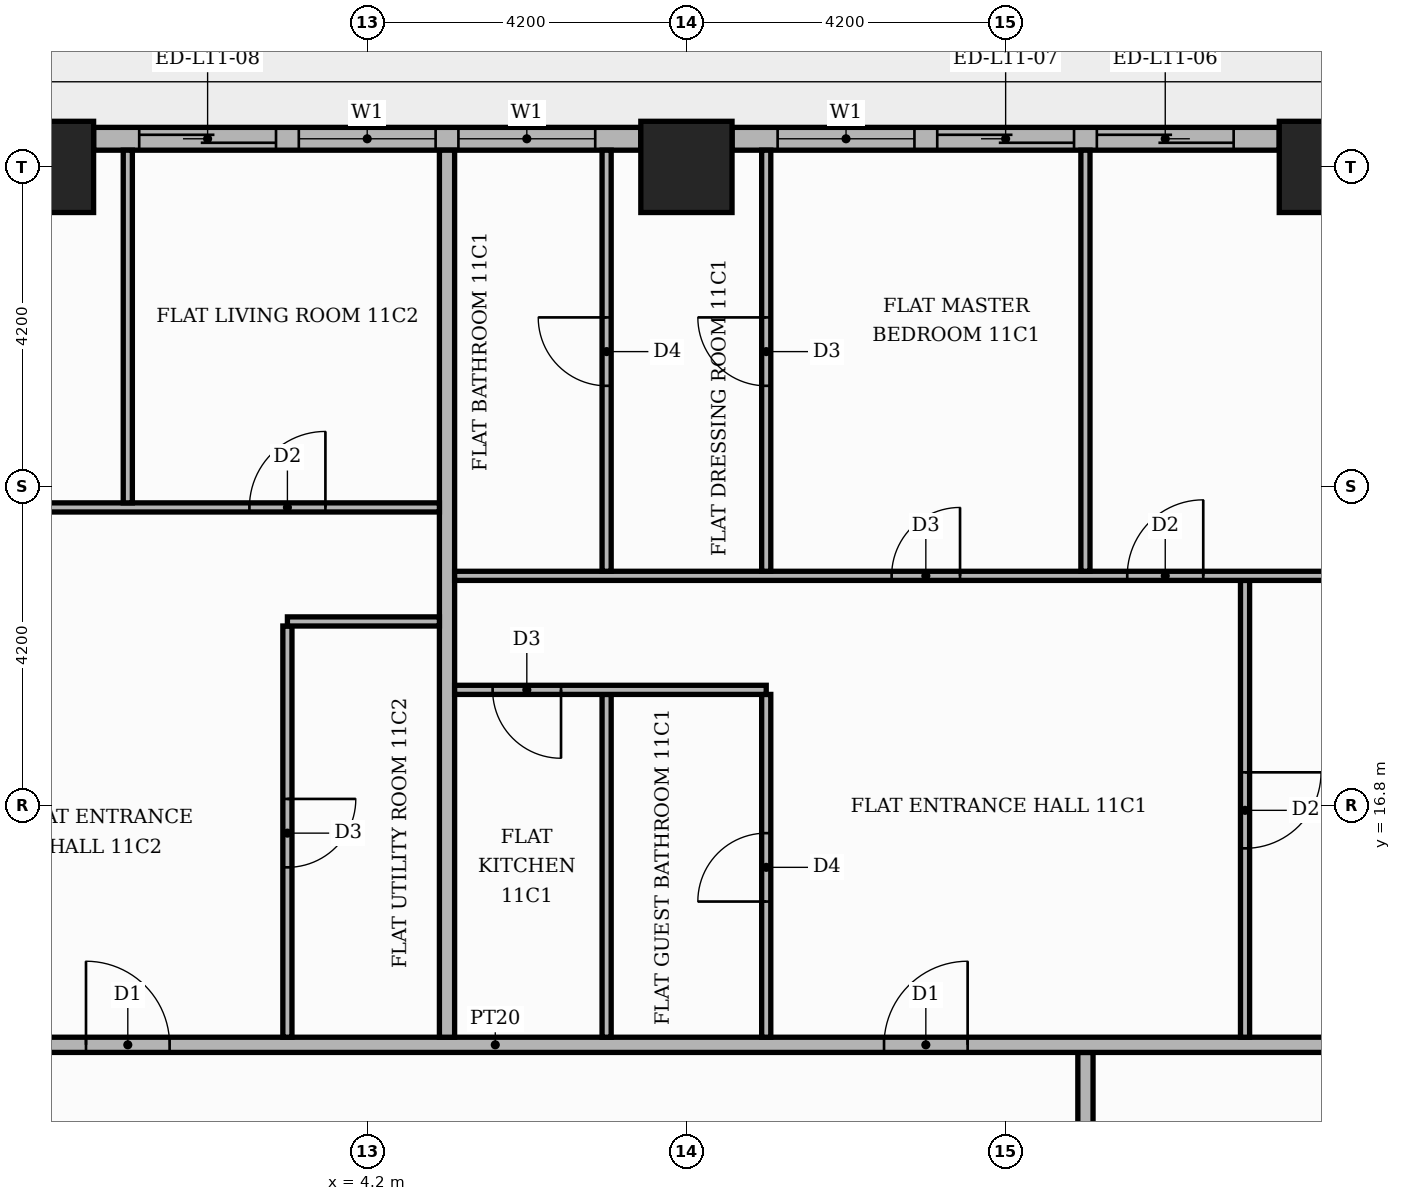
"""IFC4 building model, lengths in metres.
Left out: names, types, materials, properties, quantities, classifications, styles, units other than length and angle.
Written with IfcOpenShell. Run it as: python <this file> out.ifc"""

import sys

from ifc_helpers import new_model, si_unit, direction, frame, frame_2d, origin, origin_2d, place, context, subcontext, project, spatial, rectangle, extrude, element, fill, save


model = new_model("IFC4")
c1 = context("Model", 3, precision=1e-05, world=origin(), true_north=direction((0.0, 1.0)))
c2 = subcontext(c1, "Body", "Model", "MODEL_VIEW")
j1 = project(units=[si_unit("LENGTHUNIT", "METRE"), si_unit("PLANEANGLEUNIT", "RADIAN")], contexts=[c1])
p1 = place(None, origin())
s1 = spatial("IfcSite", under=j1, at=p1, CompositionType="ELEMENT")
p2 = place(p1, origin())
s2 = spatial("IfcBuilding", under=s1, at=p2, CompositionType="ELEMENT")
p3 = place(p2, frame((0.0, 0.0, 50.4)))
s3 = spatial("IfcBuildingStorey", under=s2, at=p3, CompositionType="ELEMENT", Elevation=50.4)
for number, where, z_axis, x_axis in (
    (1, (0.0, 25.2, 0.0), (0.0, 0.0, 1.0), (1.0, 0.0, 0.0)),
    (2, (8.4, 25.2, 0.0), (0.0, 0.0, 1.0), (1.0, 0.0, 0.0)),
    (3, (16.8, 25.2, 0.0), (0.0, 0.0, 1.0), (1.0, 0.0, 0.0)),
):
    element("IfcColumn", number, at=place(p3, frame(where, z_axis=z_axis, x_axis=x_axis)), inside=s3, PredefinedType="COLUMN", context=c2, shape_type="SweptSolid", body=[
        extrude(rectangle(XDim=1.2, YDim=1.2, at=origin_2d()), origin(), (0.0, 0.0, 1.0), 3.9),
    ])
p4 = place(p3, frame((16.2, 25.57, 0.0), z_axis=(0.0, 0.0, 1.0), x_axis=(-1.0, 0.0, 0.0)))
e4 = element("IfcWall", 4, at=p4, inside=s3, PredefinedType="STANDARD", context=c2, shape_type="SweptSolid", body=[
    extrude(rectangle(XDim=7.2, YDim=0.3, at=frame_2d((3.6, 0.0))), origin(), (0.0, 0.0, 1.0), 3.48),
])
p5 = place(p4, frame((0.6, 0.0, 0.0)))
e5 = element("IfcOpeningElement", 5, at=p5, cuts=e4, PredefinedType="OPENING", context=c2, shape_type="SweptSolid", body=[
    extrude(rectangle(XDim=1.8, YDim=2.4, at=frame_2d((0.9, 1.2))), frame((0.0, 0.16, 0.0), z_axis=(0.0, -1.0, 0.0), x_axis=(1.0, 0.0, 0.0)), (0.0, 0.0, 1.0), 0.32),
])
p6 = place(p4, frame((2.7, 0.0, 0.0)))
e6 = element("IfcOpeningElement", 6, at=p6, cuts=e4, PredefinedType="OPENING", context=c2, shape_type="SweptSolid", body=[
    extrude(rectangle(XDim=1.8, YDim=2.4, at=frame_2d((0.9, 1.2))), frame((0.0, 0.16, 0.0), z_axis=(0.0, -1.0, 0.0), x_axis=(1.0, 0.0, 0.0)), (0.0, 0.0, 1.0), 0.32),
])
p7 = place(p4, frame((4.8, 0.0, 0.9)))
e7 = element("IfcOpeningElement", 7, at=p7, cuts=e4, PredefinedType="OPENING", context=c2, shape_type="SweptSolid", body=[
    extrude(rectangle(XDim=1.8, YDim=2.1, at=frame_2d((0.9, 1.05))), frame((0.0, 0.16, 0.0), z_axis=(0.0, -1.0, 0.0), x_axis=(1.0, 0.0, 0.0)), (0.0, 0.0, 1.0), 0.32),
])
p8 = place(p3, frame((7.8, 25.57, 0.0), z_axis=(0.0, 0.0, 1.0), x_axis=(-1.0, 0.0, 0.0)))
e8 = element("IfcWall", 8, at=p8, inside=s3, PredefinedType="STANDARD", context=c2, shape_type="SweptSolid", body=[
    extrude(rectangle(XDim=7.2, YDim=0.3, at=frame_2d((3.6, 0.0))), origin(), (0.0, 0.0, 1.0), 3.48),
])
p9 = place(p8, frame((0.6, 0.0, 0.9)))
e9 = element("IfcOpeningElement", 9, at=p9, cuts=e8, PredefinedType="OPENING", context=c2, shape_type="SweptSolid", body=[
    extrude(rectangle(XDim=1.8, YDim=2.1, at=frame_2d((0.9, 1.05))), frame((0.0, 0.16, 0.0), z_axis=(0.0, -1.0, 0.0), x_axis=(1.0, 0.0, 0.0)), (0.0, 0.0, 1.0), 0.32),
])
p10 = place(p8, frame((2.7, 0.0, 0.9)))
e10 = element("IfcOpeningElement", 10, at=p10, cuts=e8, PredefinedType="OPENING", context=c2, shape_type="SweptSolid", body=[
    extrude(rectangle(XDim=1.8, YDim=2.1, at=frame_2d((0.9, 1.05))), frame((0.0, 0.16, 0.0), z_axis=(0.0, -1.0, 0.0), x_axis=(1.0, 0.0, 0.0)), (0.0, 0.0, 1.0), 0.32),
])
p11 = place(p8, frame((4.8, 0.0, 0.0)))
e11 = element("IfcOpeningElement", 11, at=p11, cuts=e8, PredefinedType="OPENING", context=c2, shape_type="SweptSolid", body=[
    extrude(rectangle(XDim=1.8, YDim=2.4, at=frame_2d((0.9, 1.2))), frame((0.0, 0.16, 0.0), z_axis=(0.0, -1.0, 0.0), x_axis=(1.0, 0.0, 0.0)), (0.0, 0.0, 1.0), 0.32),
])
p12 = place(p3, frame((13.65, -13.55, 0.0), z_axis=(0.0, 0.0, 1.0), x_axis=(0.0, 1.0, 0.0)))
e12 = element("IfcWall", 12, at=p12, inside=s3, PredefinedType="PARTITIONING", context=c2, shape_type="SweptSolid", body=[
    extrude(rectangle(XDim=27.1, YDim=0.2, at=frame_2d((13.55, 0.0))), origin(), (0.0, 0.0, 1.0), 3.48),
])
p13 = place(p12, frame((1.45, 0.0, 0.0)))
e13 = element("IfcOpeningElement", 13, at=p13, cuts=e12, PredefinedType="OPENING", context=c2, shape_type="SweptSolid", body=[
    extrude(rectangle(XDim=1.1, YDim=2.4, at=frame_2d((0.55, 1.2))), frame((0.0, 0.11, 0.0), z_axis=(0.0, -1.0, 0.0), x_axis=(1.0, 0.0, 0.0)), (0.0, 0.0, 1.0), 0.22),
])
p14 = place(p3, frame((-13.65, 13.65, 0.0), z_axis=(0.0, 0.0, 1.0), x_axis=(1.0, 0.0, 0.0)))
e14 = element("IfcWall", 14, at=p14, inside=s3, PredefinedType="PARTITIONING", context=c2, shape_type="SweptSolid", body=[
    extrude(rectangle(XDim=39.07, YDim=0.2, at=frame_2d((19.535, 0.0))), origin(), (0.0, 0.0, 1.0), 3.48),
])
p15 = place(p14, frame((24.65, 0.0, 0.0)))
e15 = element("IfcOpeningElement", 15, at=p15, cuts=e14, PredefinedType="OPENING", context=c2, shape_type="SweptSolid", body=[
    extrude(rectangle(XDim=1.1, YDim=2.4, at=frame_2d((0.55, 1.2))), frame((0.0, 0.11, 0.0), z_axis=(0.0, -1.0, 0.0), x_axis=(1.0, 0.0, 0.0)), (0.0, 0.0, 1.0), 0.22),
])
p16 = place(p14, frame((14.15, 0.0, 0.0)))
e16 = element("IfcOpeningElement", 16, at=p16, cuts=e14, PredefinedType="OPENING", context=c2, shape_type="SweptSolid", body=[
    extrude(rectangle(XDim=1.1, YDim=2.4, at=frame_2d((0.55, 1.2))), frame((0.0, 0.11, 0.0), z_axis=(0.0, -1.0, 0.0), x_axis=(1.0, 0.0, 0.0)), (0.0, 0.0, 1.0), 0.22),
])
p17 = place(p3, frame((3.15, 13.75, 0.0), z_axis=(0.0, 0.0, 1.0), x_axis=(0.0, 1.0, 0.0)))
e17 = element("IfcWall", 17, at=p17, inside=s3, PredefinedType="PARTITIONING", context=c2, shape_type="SweptSolid", body=[
    extrude(rectangle(XDim=5.41, YDim=0.12, at=frame_2d((2.705, 0.0))), origin(), (0.0, 0.0, 1.0), 3.48),
])
p18 = place(p17, frame((2.235, 0.0, 0.0)))
e18 = element("IfcOpeningElement", 18, at=p18, cuts=e17, PredefinedType="OPENING", context=c2, shape_type="SweptSolid", body=[
    extrude(rectangle(XDim=0.9, YDim=2.1, at=frame_2d((0.45, 1.05))), frame((0.0, 0.07, 0.0), z_axis=(0.0, -1.0, 0.0), x_axis=(1.0, 0.0, 0.0)), (0.0, 0.0, 1.0), 0.14),
])
p19 = place(p3, frame((5.25, 13.75, 0.0), z_axis=(0.0, 0.0, 1.0), x_axis=(0.0, 1.0, 0.0)))
e19 = element("IfcWall", 19, at=p19, inside=s3, PredefinedType="PARTITIONING", context=c2, shape_type="SweptSolid", body=[
    extrude(rectangle(XDim=11.67, YDim=0.2, at=frame_2d((5.835, 0.0))), origin(), (0.0, 0.0, 1.0), 3.48),
])
p20 = place(p3, frame((7.35, 13.75, 0.0), z_axis=(0.0, 0.0, 1.0), x_axis=(0.0, 1.0, 0.0)))
e20 = element("IfcWall", 20, at=p20, inside=s3, PredefinedType="PARTITIONING", context=c2, shape_type="SweptSolid", body=[
    extrude(rectangle(XDim=4.51, YDim=0.12, at=frame_2d((2.255, 0.0))), origin(), (0.0, 0.0, 1.0), 3.48),
])
p21 = place(p3, frame((9.45, 13.75, 0.0), z_axis=(0.0, 0.0, 1.0), x_axis=(0.0, 1.0, 0.0)))
e21 = element("IfcWall", 21, at=p21, inside=s3, PredefinedType="PARTITIONING", context=c2, shape_type="SweptSolid", body=[
    extrude(rectangle(XDim=4.51, YDim=0.12, at=frame_2d((2.255, 0.0))), origin(), (0.0, 0.0, 1.0), 3.48),
])
p22 = place(p21, frame((1.785, 0.0, 0.0)))
e22 = element("IfcOpeningElement", 22, at=p22, cuts=e21, PredefinedType="OPENING", context=c2, shape_type="SweptSolid", body=[
    extrude(rectangle(XDim=0.9, YDim=2.1, at=frame_2d((0.45, 1.05))), frame((0.0, 0.07, 0.0), z_axis=(0.0, -1.0, 0.0), x_axis=(1.0, 0.0, 0.0)), (0.0, 0.0, 1.0), 0.14),
])
p23 = place(p3, frame((15.75, 13.75, 0.0), z_axis=(0.0, 0.0, 1.0), x_axis=(0.0, 1.0, 0.0)))
e23 = element("IfcWall", 23, at=p23, inside=s3, PredefinedType="PARTITIONING", context=c2, shape_type="SweptSolid", body=[
    extrude(rectangle(XDim=6.01, YDim=0.12, at=frame_2d((3.005, 0.0))), origin(), (0.0, 0.0, 1.0), 3.48),
])
p24 = place(p23, frame((2.485, 0.0, 0.0)))
e24 = element("IfcOpeningElement", 24, at=p24, cuts=e23, PredefinedType="OPENING", context=c2, shape_type="SweptSolid", body=[
    extrude(rectangle(XDim=1.0, YDim=2.1, at=frame_2d((0.5, 1.05))), frame((0.0, 0.07, 0.0), z_axis=(0.0, -1.0, 0.0), x_axis=(1.0, 0.0, 0.0)), (0.0, 0.0, 1.0), 0.14),
])
p25 = place(p3, frame((5.35, 18.32, 0.0), z_axis=(0.0, 0.0, 1.0), x_axis=(1.0, 0.0, 0.0)))
e25 = element("IfcWall", 25, at=p25, inside=s3, PredefinedType="PARTITIONING", context=c2, shape_type="SweptSolid", body=[
    extrude(rectangle(XDim=4.1, YDim=0.12, at=frame_2d((2.05, 0.0))), origin(), (0.0, 0.0, 1.0), 3.48),
])
p26 = place(p25, frame((0.5, 0.0, 0.0)))
e26 = element("IfcOpeningElement", 26, at=p26, cuts=e25, PredefinedType="OPENING", context=c2, shape_type="SweptSolid", body=[
    extrude(rectangle(XDim=0.9, YDim=2.1, at=frame_2d((0.45, 1.05))), frame((0.0, 0.07, 0.0), z_axis=(0.0, -1.0, 0.0), x_axis=(1.0, 0.0, 0.0)), (0.0, 0.0, 1.0), 0.14),
])
p27 = place(p3, frame((3.15, 19.22, 0.0), z_axis=(0.0, 0.0, 1.0), x_axis=(1.0, 0.0, 0.0)))
e27 = element("IfcWall", 27, at=p27, inside=s3, PredefinedType="PARTITIONING", context=c2, shape_type="SweptSolid", body=[
    extrude(rectangle(XDim=2.0, YDim=0.12, at=frame_2d((1.0, 0.0))), origin(), (0.0, 0.0, 1.0), 3.48),
])
p28 = place(p3, frame((5.35, 19.82, 0.0), z_axis=(0.0, 0.0, 1.0), x_axis=(1.0, 0.0, 0.0)))
e28 = element("IfcWall", 28, at=p28, inside=s3, PredefinedType="PARTITIONING", context=c2, shape_type="SweptSolid", body=[
    extrude(rectangle(XDim=11.95, YDim=0.12, at=frame_2d((5.975, 0.0))), origin(), (0.0, 0.0, 1.0), 3.48),
])
p29 = place(p28, frame((8.85, 0.0, 0.0)))
e29 = element("IfcOpeningElement", 29, at=p29, cuts=e28, PredefinedType="OPENING", context=c2, shape_type="SweptSolid", body=[
    extrude(rectangle(XDim=1.0, YDim=2.1, at=frame_2d((0.5, 1.05))), frame((0.0, 0.07, 0.0), z_axis=(0.0, -1.0, 0.0), x_axis=(1.0, 0.0, 0.0)), (0.0, 0.0, 1.0), 0.14),
])
p30 = place(p28, frame((5.75, 0.0, 0.0)))
e30 = element("IfcOpeningElement", 30, at=p30, cuts=e28, PredefinedType="OPENING", context=c2, shape_type="SweptSolid", body=[
    extrude(rectangle(XDim=0.9, YDim=2.1, at=frame_2d((0.45, 1.05))), frame((0.0, 0.07, 0.0), z_axis=(0.0, -1.0, 0.0), x_axis=(1.0, 0.0, 0.0)), (0.0, 0.0, 1.0), 0.14),
])
p31 = place(p3, frame((7.35, 19.88, 0.0), z_axis=(0.0, 0.0, 1.0), x_axis=(0.0, 1.0, 0.0)))
e31 = element("IfcWall", 31, at=p31, inside=s3, PredefinedType="PARTITIONING", context=c2, shape_type="SweptSolid", body=[
    extrude(rectangle(XDim=5.54, YDim=0.12, at=frame_2d((2.77, 0.0))), origin(), (0.0, 0.0, 1.0), 3.48),
])
p32 = place(p31, frame((2.44, 0.0, 0.0)))
e32 = element("IfcOpeningElement", 32, at=p32, cuts=e31, PredefinedType="OPENING", context=c2, shape_type="SweptSolid", body=[
    extrude(rectangle(XDim=0.9, YDim=2.1, at=frame_2d((0.45, 1.05))), frame((0.0, 0.07, 0.0), z_axis=(0.0, -1.0, 0.0), x_axis=(1.0, 0.0, 0.0)), (0.0, 0.0, 1.0), 0.14),
])
p33 = place(p3, frame((9.45, 19.88, 0.0), z_axis=(0.0, 0.0, 1.0), x_axis=(0.0, 1.0, 0.0)))
e33 = element("IfcWall", 33, at=p33, inside=s3, PredefinedType="PARTITIONING", context=c2, shape_type="SweptSolid", body=[
    extrude(rectangle(XDim=5.54, YDim=0.12, at=frame_2d((2.77, 0.0))), origin(), (0.0, 0.0, 1.0), 3.48),
])
p34 = place(p33, frame((2.44, 0.0, 0.0)))
e34 = element("IfcOpeningElement", 34, at=p34, cuts=e33, PredefinedType="OPENING", context=c2, shape_type="SweptSolid", body=[
    extrude(rectangle(XDim=0.9, YDim=2.1, at=frame_2d((0.45, 1.05))), frame((0.0, 0.07, 0.0), z_axis=(0.0, -1.0, 0.0), x_axis=(1.0, 0.0, 0.0)), (0.0, 0.0, 1.0), 0.14),
])
p35 = place(p3, frame((13.65, 19.88, 0.0), z_axis=(0.0, 0.0, 1.0), x_axis=(0.0, 1.0, 0.0)))
e35 = element("IfcWall", 35, at=p35, inside=s3, PredefinedType="PARTITIONING", context=c2, shape_type="SweptSolid", body=[
    extrude(rectangle(XDim=5.54, YDim=0.12, at=frame_2d((2.77, 0.0))), origin(), (0.0, 0.0, 1.0), 3.48),
])
p36 = place(p3, frame((-13.55, 20.72, 0.0), z_axis=(0.0, 0.0, 1.0), x_axis=(1.0, 0.0, 0.0)))
e36 = element("IfcWall", 36, at=p36, inside=s3, PredefinedType="PARTITIONING", context=c2, shape_type="SweptSolid", body=[
    extrude(rectangle(XDim=18.7, YDim=0.12, at=frame_2d((9.35, 0.0))), origin(), (0.0, 0.0, 1.0), 3.48),
])
p37 = place(p36, frame((16.2, 0.0, 0.0)))
e37 = element("IfcOpeningElement", 37, at=p37, cuts=e36, PredefinedType="OPENING", context=c2, shape_type="SweptSolid", body=[
    extrude(rectangle(XDim=1.0, YDim=2.1, at=frame_2d((0.5, 1.05))), frame((0.0, 0.07, 0.0), z_axis=(0.0, -1.0, 0.0), x_axis=(1.0, 0.0, 0.0)), (0.0, 0.0, 1.0), 0.14),
])
p38 = place(p36, frame((12.05, 0.0, 0.0)))
e38 = element("IfcOpeningElement", 38, at=p38, cuts=e36, PredefinedType="OPENING", context=c2, shape_type="SweptSolid", body=[
    extrude(rectangle(XDim=0.9, YDim=2.1, at=frame_2d((0.45, 1.05))), frame((0.0, 0.07, 0.0), z_axis=(0.0, -1.0, 0.0), x_axis=(1.0, 0.0, 0.0)), (0.0, 0.0, 1.0), 0.14),
])
p39 = place(p36, frame((3.65, 0.0, 0.0)))
e39 = element("IfcOpeningElement", 39, at=p39, cuts=e36, PredefinedType="OPENING", context=c2, shape_type="SweptSolid", body=[
    extrude(rectangle(XDim=0.9, YDim=2.1, at=frame_2d((0.45, 1.05))), frame((0.0, 0.07, 0.0), z_axis=(0.0, -1.0, 0.0), x_axis=(1.0, 0.0, 0.0)), (0.0, 0.0, 1.0), 0.14),
])
p40 = place(p3, frame((1.05, 20.78, 0.0), z_axis=(0.0, 0.0, 1.0), x_axis=(0.0, 1.0, 0.0)))
e40 = element("IfcWall", 40, at=p40, inside=s3, PredefinedType="PARTITIONING", context=c2, shape_type="SweptSolid", body=[
    extrude(rectangle(XDim=4.64, YDim=0.12, at=frame_2d((2.32, 0.0))), origin(), (0.0, 0.0, 1.0), 3.48),
])
p41 = place(p5, origin())
e41 = element("IfcDoor", 41, at=p41, inside=s3, OperationType="SLIDING_TO_LEFT", PredefinedType="DOOR", context=c2, shape_type="SweptSolid", body=[
    extrude(rectangle(XDim=1.8, YDim=2.4, at=frame_2d((0.9, 1.2))), frame((0.0, 0.025, 0.0), z_axis=(0.0, -1.0, 0.0), x_axis=(1.0, 0.0, 0.0)), (0.0, 0.0, 1.0), 0.05),
])
fill(e5, e41)
p42 = place(p6, origin())
e42 = element("IfcDoor", 42, at=p42, inside=s3, OperationType="SLIDING_TO_RIGHT", PredefinedType="DOOR", context=c2, shape_type="SweptSolid", body=[
    extrude(rectangle(XDim=1.8, YDim=2.4, at=frame_2d((0.9, 1.2))), frame((0.0, 0.025, 0.0), z_axis=(0.0, -1.0, 0.0), x_axis=(1.0, 0.0, 0.0)), (0.0, 0.0, 1.0), 0.05),
])
fill(e6, e42)
p43 = place(p7, origin())
e43 = element("IfcWindow", 43, at=p43, inside=s3, PartitioningType="SINGLE_PANEL", PredefinedType="WINDOW", context=c2, shape_type="SweptSolid", body=[
    extrude(rectangle(XDim=1.8, YDim=2.1, at=frame_2d((0.9, 1.05))), frame((0.0, 0.03, 0.0), z_axis=(0.0, -1.0, 0.0), x_axis=(1.0, 0.0, 0.0)), (0.0, 0.0, 1.0), 0.06),
])
fill(e7, e43)
p44 = place(p9, origin())
e44 = element("IfcWindow", 44, at=p44, inside=s3, PartitioningType="SINGLE_PANEL", PredefinedType="WINDOW", context=c2, shape_type="SweptSolid", body=[
    extrude(rectangle(XDim=1.8, YDim=2.1, at=frame_2d((0.9, 1.05))), frame((0.0, 0.03, 0.0), z_axis=(0.0, -1.0, 0.0), x_axis=(1.0, 0.0, 0.0)), (0.0, 0.0, 1.0), 0.06),
])
fill(e9, e44)
p45 = place(p10, origin())
e45 = element("IfcWindow", 45, at=p45, inside=s3, PartitioningType="SINGLE_PANEL", PredefinedType="WINDOW", context=c2, shape_type="SweptSolid", body=[
    extrude(rectangle(XDim=1.8, YDim=2.1, at=frame_2d((0.9, 1.05))), frame((0.0, 0.03, 0.0), z_axis=(0.0, -1.0, 0.0), x_axis=(1.0, 0.0, 0.0)), (0.0, 0.0, 1.0), 0.06),
])
fill(e10, e45)
p46 = place(p11, origin())
e46 = element("IfcDoor", 46, at=p46, inside=s3, OperationType="SLIDING_TO_RIGHT", PredefinedType="DOOR", context=c2, shape_type="SweptSolid", body=[
    extrude(rectangle(XDim=1.8, YDim=2.4, at=frame_2d((0.9, 1.2))), frame((0.0, 0.025, 0.0), z_axis=(0.0, -1.0, 0.0), x_axis=(1.0, 0.0, 0.0)), (0.0, 0.0, 1.0), 0.05),
])
fill(e11, e46)
p47 = place(p15, origin())
e47 = element("IfcDoor", 47, at=p47, inside=s3, OperationType="SINGLE_SWING_RIGHT", PredefinedType="DOOR", context=c2, shape_type="SweptSolid", body=[
    extrude(rectangle(XDim=1.1, YDim=2.4, at=frame_2d((0.55, 1.2))), frame((0.0, 0.025, 0.0), z_axis=(0.0, -1.0, 0.0), x_axis=(1.0, 0.0, 0.0)), (0.0, 0.0, 1.0), 0.05),
])
fill(e15, e47)
p48 = place(p24, frame((1.0, 0.0, 0.0), z_axis=(0.0, 0.0, 1.0), x_axis=(-1.0, 0.0, 0.0)))
e48 = element("IfcDoor", 48, at=p48, inside=s3, OperationType="SINGLE_SWING_RIGHT", PredefinedType="DOOR", context=c2, shape_type="SweptSolid", body=[
    extrude(rectangle(XDim=1.0, YDim=2.1, at=frame_2d((0.5, 1.05))), frame((0.0, 0.025, 0.0), z_axis=(0.0, -1.0, 0.0), x_axis=(1.0, 0.0, 0.0)), (0.0, 0.0, 1.0), 0.05),
])
fill(e24, e48)
p49 = place(p22, origin())
e49 = element("IfcDoor", 49, at=p49, inside=s3, OperationType="SINGLE_SWING_LEFT", PredefinedType="DOOR", context=c2, shape_type="SweptSolid", body=[
    extrude(rectangle(XDim=0.9, YDim=2.1, at=frame_2d((0.45, 1.05))), frame((0.0, 0.025, 0.0), z_axis=(0.0, -1.0, 0.0), x_axis=(1.0, 0.0, 0.0)), (0.0, 0.0, 1.0), 0.05),
])
fill(e22, e49)
p50 = place(p26, frame((0.9, 0.0, 0.0), z_axis=(0.0, 0.0, 1.0), x_axis=(-1.0, 0.0, 0.0)))
e50 = element("IfcDoor", 50, at=p50, inside=s3, OperationType="SINGLE_SWING_RIGHT", PredefinedType="DOOR", context=c2, shape_type="SweptSolid", body=[
    extrude(rectangle(XDim=0.9, YDim=2.1, at=frame_2d((0.45, 1.05))), frame((0.0, 0.025, 0.0), z_axis=(0.0, -1.0, 0.0), x_axis=(1.0, 0.0, 0.0)), (0.0, 0.0, 1.0), 0.05),
])
fill(e26, e50)
p51 = place(p29, origin())
e51 = element("IfcDoor", 51, at=p51, inside=s3, OperationType="SINGLE_SWING_RIGHT", PredefinedType="DOOR", context=c2, shape_type="SweptSolid", body=[
    extrude(rectangle(XDim=1.0, YDim=2.1, at=frame_2d((0.5, 1.05))), frame((0.0, 0.025, 0.0), z_axis=(0.0, -1.0, 0.0), x_axis=(1.0, 0.0, 0.0)), (0.0, 0.0, 1.0), 0.05),
])
fill(e29, e51)
p52 = place(p30, origin())
e52 = element("IfcDoor", 52, at=p52, inside=s3, OperationType="SINGLE_SWING_RIGHT", PredefinedType="DOOR", context=c2, shape_type="SweptSolid", body=[
    extrude(rectangle(XDim=0.9, YDim=2.1, at=frame_2d((0.45, 1.05))), frame((0.0, 0.025, 0.0), z_axis=(0.0, -1.0, 0.0), x_axis=(1.0, 0.0, 0.0)), (0.0, 0.0, 1.0), 0.05),
])
fill(e30, e52)
p53 = place(p34, origin())
e53 = element("IfcDoor", 53, at=p53, inside=s3, OperationType="SINGLE_SWING_RIGHT", PredefinedType="DOOR", context=c2, shape_type="SweptSolid", body=[
    extrude(rectangle(XDim=0.9, YDim=2.1, at=frame_2d((0.45, 1.05))), frame((0.0, 0.025, 0.0), z_axis=(0.0, -1.0, 0.0), x_axis=(1.0, 0.0, 0.0)), (0.0, 0.0, 1.0), 0.05),
])
fill(e34, e53)
p54 = place(p32, origin())
e54 = element("IfcDoor", 54, at=p54, inside=s3, OperationType="SINGLE_SWING_RIGHT", PredefinedType="DOOR", context=c2, shape_type="SweptSolid", body=[
    extrude(rectangle(XDim=0.9, YDim=2.1, at=frame_2d((0.45, 1.05))), frame((0.0, 0.025, 0.0), z_axis=(0.0, -1.0, 0.0), x_axis=(1.0, 0.0, 0.0)), (0.0, 0.0, 1.0), 0.05),
])
fill(e32, e54)
p55 = place(p16, origin())
e55 = element("IfcDoor", 55, at=p55, inside=s3, OperationType="SINGLE_SWING_LEFT", PredefinedType="DOOR", context=c2, shape_type="SweptSolid", body=[
    extrude(rectangle(XDim=1.1, YDim=2.4, at=frame_2d((0.55, 1.2))), frame((0.0, 0.025, 0.0), z_axis=(0.0, -1.0, 0.0), x_axis=(1.0, 0.0, 0.0)), (0.0, 0.0, 1.0), 0.05),
])
fill(e16, e55)
p56 = place(p18, frame((0.9, 0.0, 0.0), z_axis=(0.0, 0.0, 1.0), x_axis=(-1.0, 0.0, 0.0)))
e56 = element("IfcDoor", 56, at=p56, inside=s3, OperationType="SINGLE_SWING_RIGHT", PredefinedType="DOOR", context=c2, shape_type="SweptSolid", body=[
    extrude(rectangle(XDim=0.9, YDim=2.1, at=frame_2d((0.45, 1.05))), frame((0.0, 0.025, 0.0), z_axis=(0.0, -1.0, 0.0), x_axis=(1.0, 0.0, 0.0)), (0.0, 0.0, 1.0), 0.05),
])
fill(e18, e56)
p57 = place(p37, origin())
e57 = element("IfcDoor", 57, at=p57, inside=s3, OperationType="SINGLE_SWING_RIGHT", PredefinedType="DOOR", context=c2, shape_type="SweptSolid", body=[
    extrude(rectangle(XDim=1.0, YDim=2.1, at=frame_2d((0.5, 1.05))), frame((0.0, 0.025, 0.0), z_axis=(0.0, -1.0, 0.0), x_axis=(1.0, 0.0, 0.0)), (0.0, 0.0, 1.0), 0.05),
])
fill(e37, e57)
save(model, sys.argv[1])
